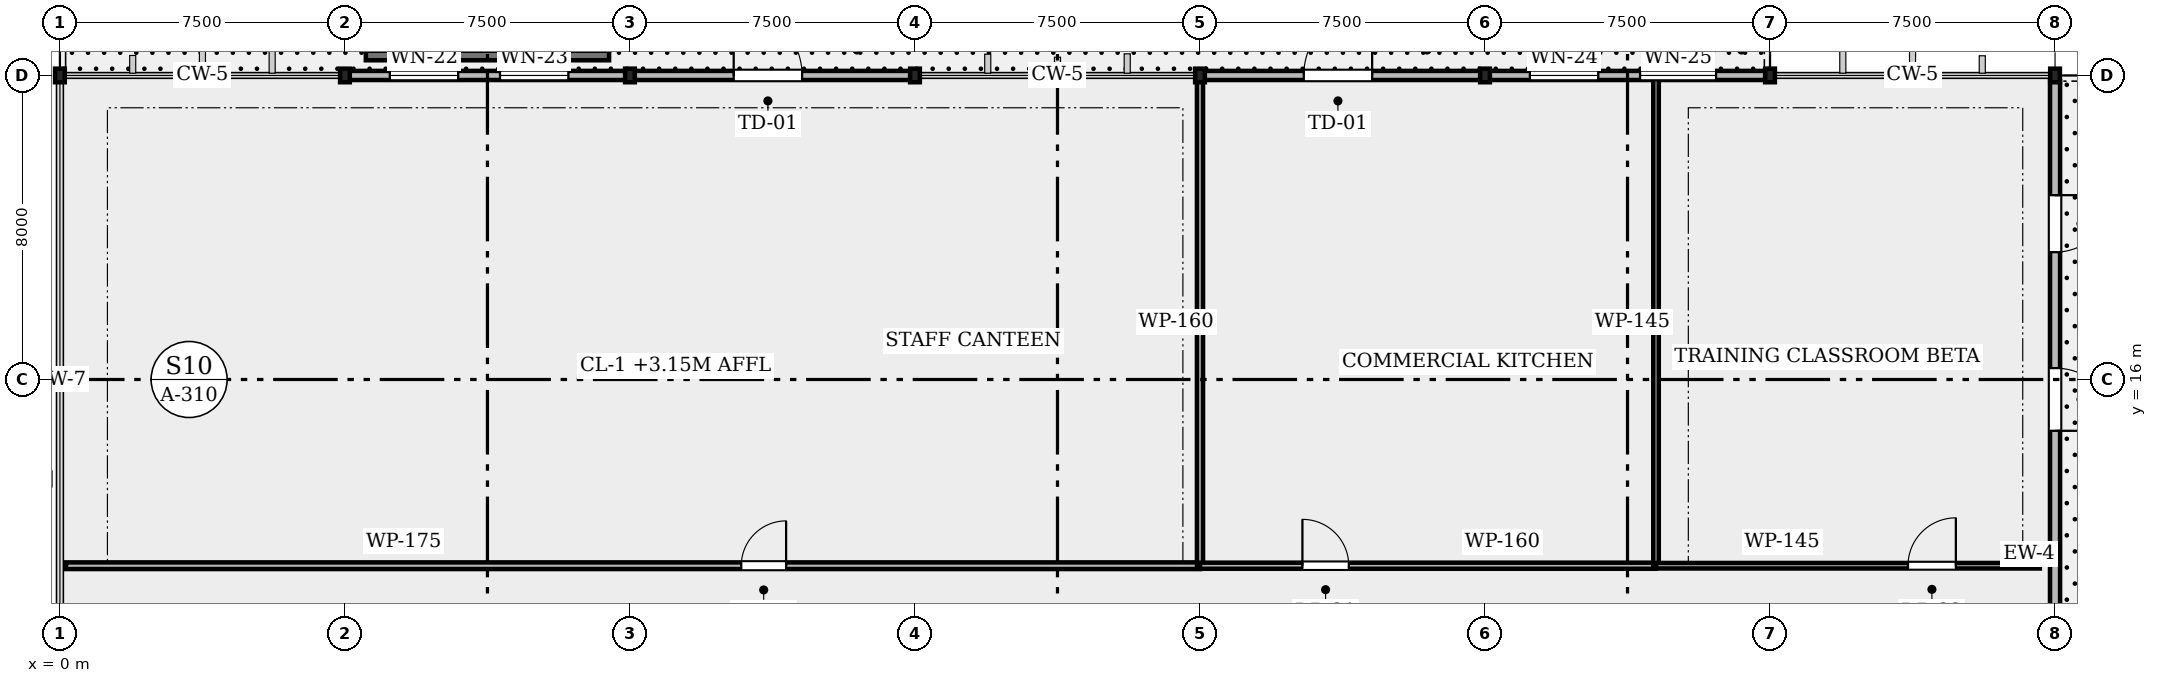
"""IFC4 building model, lengths in metres.
Left out: names, types, materials, properties, quantities, classifications, styles, units other than length and angle.
Written with IfcOpenShell. Run it as: python <this file> out.ifc"""

import sys

from ifc_helpers import new_model, si_unit, direction, frame, frame_2d, origin, origin_2d, place, context, subcontext, project, spatial, rectangle, i_section, extrude, element, fill, save


model = new_model("IFC4")
c1 = context("Model", 3, precision=1e-05, world=origin(), true_north=direction((0.0, 1.0)))
c2 = subcontext(c1, "Body", "Model", "MODEL_VIEW")
j1 = project(units=[si_unit("LENGTHUNIT", "METRE"), si_unit("PLANEANGLEUNIT", "RADIAN")], contexts=[c1])
p1 = place(None, origin())
s1 = spatial("IfcSite", under=j1, at=p1, CompositionType="ELEMENT")
p2 = place(p1, origin())
s2 = spatial("IfcBuilding", under=s1, at=p2, CompositionType="ELEMENT")
p3 = place(p2, frame((0.0, 0.0, 9.0)))
s3 = spatial("IfcBuildingStorey", under=s2, at=p3, CompositionType="ELEMENT", Elevation=9.0)
for number, where, z_axis, x_axis in (
    (1, (0.0, 24.0, 0.0), (0.0, 0.0, 1.0), (1.0, 0.0, 0.0)),
    (2, (7.5, 24.0, 0.0), (0.0, 0.0, 1.0), (1.0, 0.0, 0.0)),
    (3, (15.0, 24.0, 0.0), (0.0, 0.0, 1.0), (1.0, 0.0, 0.0)),
    (4, (22.5, 24.0, 0.0), (0.0, 0.0, 1.0), (1.0, 0.0, 0.0)),
    (5, (30.0, 24.0, 0.0), (0.0, 0.0, 1.0), (1.0, 0.0, 0.0)),
    (6, (37.5, 24.0, 0.0), (0.0, 0.0, 1.0), (1.0, 0.0, 0.0)),
    (7, (45.0, 24.0, 0.0), (0.0, 0.0, 1.0), (1.0, 0.0, 0.0)),
    (8, (52.5, 24.0, 0.0), (0.0, 0.0, 1.0), (1.0, 0.0, 0.0)),
):
    element("IfcColumn", number, at=place(p3, frame(where, z_axis=z_axis, x_axis=x_axis)), inside=s3, PredefinedType="COLUMN", context=c2, shape_type="SweptSolid", body=[
        extrude(i_section(OverallWidth=0.255, OverallDepth=0.357, WebThickness=0.01, FlangeThickness=0.018, FilletRadius=0.015, at=origin_2d()), origin(), (0.0, 0.0, 1.0), 5.86),
    ])
p4 = place(p3, frame((7.58, 24.0, 0.0), z_axis=(0.0, 0.0, 1.0), x_axis=(1.0, 0.0, 0.0)))
e9 = element("IfcWall", 9, at=p4, inside=s3, PredefinedType="SOLIDWALL", context=c2, shape_type="SweptSolid", body=[
    extrude(rectangle(XDim=7.34, YDim=0.24, at=frame_2d((3.67, 0.0))), origin(), (0.0, 0.0, 1.0), 3.8),
])
p5 = place(p4, frame((1.1, 0.0, 1.05)))
e10 = element("IfcOpeningElement", 10, at=p5, cuts=e9, PredefinedType="OPENING", context=c2, shape_type="SweptSolid", body=[
    extrude(rectangle(XDim=1.8, YDim=1.5, at=frame_2d((0.9, 0.75))), frame((0.0, 0.13, 0.0), z_axis=(0.0, -1.0, 0.0), x_axis=(1.0, 0.0, 0.0)), (0.0, 0.0, 1.0), 0.26),
])
p6 = place(p4, frame((4.0, 0.0, 1.05)))
e11 = element("IfcOpeningElement", 11, at=p6, cuts=e9, PredefinedType="OPENING", context=c2, shape_type="SweptSolid", body=[
    extrude(rectangle(XDim=1.8, YDim=1.65, at=frame_2d((0.9, 0.825))), frame((0.0, 0.13, 0.0), z_axis=(0.0, -1.0, 0.0), x_axis=(1.0, 0.0, 0.0)), (0.0, 0.0, 1.0), 0.26),
])
p7 = place(p3, frame((15.08, 24.0, 0.0), z_axis=(0.0, 0.0, 1.0), x_axis=(1.0, 0.0, 0.0)))
e12 = element("IfcWall", 12, at=p7, inside=s3, PredefinedType="SOLIDWALL", context=c2, shape_type="SweptSolid", body=[
    extrude(rectangle(XDim=7.34, YDim=0.24, at=frame_2d((3.67, 0.0))), origin(), (0.0, 0.0, 1.0), 4.3),
])
p8 = place(p7, frame((2.65, 0.0, 0.0)))
e13 = element("IfcOpeningElement", 13, at=p8, cuts=e12, PredefinedType="OPENING", context=c2, shape_type="SweptSolid", body=[
    extrude(rectangle(XDim=1.8, YDim=2.15, at=frame_2d((0.9, 1.075))), frame((0.0, 0.13, 0.0), z_axis=(0.0, -1.0, 0.0), x_axis=(1.0, 0.0, 0.0)), (0.0, 0.0, 1.0), 0.26),
])
p9 = place(p3, frame((30.08, 24.0, 0.0), z_axis=(0.0, 0.0, 1.0), x_axis=(1.0, 0.0, 0.0)))
e14 = element("IfcWall", 14, at=p9, inside=s3, PredefinedType="SOLIDWALL", context=c2, shape_type="SweptSolid", body=[
    extrude(rectangle(XDim=7.34, YDim=0.24, at=frame_2d((3.67, 0.0))), origin(), (0.0, 0.0, 1.0), 4.3),
])
p10 = place(p9, frame((2.65, 0.0, 0.0)))
e15 = element("IfcOpeningElement", 15, at=p10, cuts=e14, PredefinedType="OPENING", context=c2, shape_type="SweptSolid", body=[
    extrude(rectangle(XDim=1.8, YDim=2.15, at=frame_2d((0.9, 1.075))), frame((0.0, 0.13, 0.0), z_axis=(0.0, -1.0, 0.0), x_axis=(1.0, 0.0, 0.0)), (0.0, 0.0, 1.0), 0.26),
])
p11 = place(p3, frame((37.58, 24.0, 0.0), z_axis=(0.0, 0.0, 1.0), x_axis=(1.0, 0.0, 0.0)))
e16 = element("IfcWall", 16, at=p11, inside=s3, PredefinedType="SOLIDWALL", context=c2, shape_type="SweptSolid", body=[
    extrude(rectangle(XDim=7.34, YDim=0.24, at=frame_2d((3.67, 0.0))), origin(), (0.0, 0.0, 1.0), 3.8),
])
p12 = place(p11, frame((1.1, 0.0, 1.05)))
e17 = element("IfcOpeningElement", 17, at=p12, cuts=e16, PredefinedType="OPENING", context=c2, shape_type="SweptSolid", body=[
    extrude(rectangle(XDim=1.8, YDim=1.8, at=frame_2d((0.9, 0.9))), frame((0.0, 0.13, 0.0), z_axis=(0.0, -1.0, 0.0), x_axis=(1.0, 0.0, 0.0)), (0.0, 0.0, 1.0), 0.26),
])
p13 = place(p11, frame((4.0, 0.0, 1.05)))
e18 = element("IfcOpeningElement", 18, at=p13, cuts=e16, PredefinedType="OPENING", context=c2, shape_type="SweptSolid", body=[
    extrude(rectangle(XDim=2.0, YDim=1.2, at=frame_2d((1.0, 0.6))), frame((0.0, 0.13, 0.0), z_axis=(0.0, -1.0, 0.0), x_axis=(1.0, 0.0, 0.0)), (0.0, 0.0, 1.0), 0.26),
])
p14 = place(p3, frame((52.5, 8.15, 0.0), z_axis=(0.0, 0.0, 1.0), x_axis=(0.0, 1.0, 0.0)))
e19 = element("IfcWall", 19, at=p14, inside=s3, PredefinedType="SOLIDWALL", context=c2, shape_type="SweptSolid", body=[
    extrude(rectangle(XDim=15.7, YDim=0.265, at=frame_2d((7.85, 0.0))), origin(), (0.0, 0.0, 1.0), 4.3),
])
p15 = place(p14, frame((6.5, 0.0, 0.0)))
e20 = element("IfcOpeningElement", 20, at=p15, cuts=e19, PredefinedType="OPENING", context=c2, shape_type="SweptSolid", body=[
    extrude(rectangle(XDim=1.65, YDim=2.15, at=frame_2d((0.825, 1.075))), frame((0.0, 0.142, 0.0), z_axis=(0.0, -1.0, 0.0), x_axis=(1.0, 0.0, 0.0)), (0.0, 0.0, 1.0), 0.285),
])
p16 = place(p14, frame((11.2, 0.0, 0.0)))
e21 = element("IfcOpeningElement", 21, at=p16, cuts=e19, PredefinedType="OPENING", context=c2, shape_type="SweptSolid", body=[
    extrude(rectangle(XDim=1.5, YDim=2.15, at=frame_2d((0.75, 1.075))), frame((0.0, 0.142, 0.0), z_axis=(0.0, -1.0, 0.0), x_axis=(1.0, 0.0, 0.0)), (0.0, 0.0, 1.0), 0.285),
])
p17 = place(p3, frame((8.05, 24.525, 0.0), z_axis=(0.0, 0.0, 1.0), x_axis=(1.0, 0.0, 0.0)))
e22 = element("IfcWall", 22, at=p17, inside=s3, PredefinedType="SHEAR", context=c2, shape_type="SweptSolid", body=[
    extrude(rectangle(XDim=6.4, YDim=0.25, at=frame_2d((3.2, 0.0))), origin(), (0.0, 0.0, 1.0), 3.55),
])
p18 = place(p3, frame((0.16, 11.1, 0.0), z_axis=(0.0, 0.0, 1.0), x_axis=(1.0, 0.0, 0.0)))
e23 = element("IfcWall", 23, at=p18, inside=s3, PredefinedType="PARTITIONING", context=c2, shape_type="SweptSolid", body=[
    extrude(rectangle(XDim=29.84, YDim=0.175, at=frame_2d((14.92, 0.0))), origin(), (0.0, 0.0, 1.0), 3.7),
])
p19 = place(p18, frame((17.769, 0.0, 0.0)))
e24 = element("IfcOpeningElement", 24, at=p19, cuts=e23, PredefinedType="OPENING", context=c2, shape_type="SweptSolid", body=[
    extrude(rectangle(XDim=1.18, YDim=2.14, at=frame_2d((0.59, 1.07))), frame((0.0, 0.097, 0.0), z_axis=(0.0, -1.0, 0.0), x_axis=(1.0, 0.0, 0.0)), (0.0, 0.0, 1.0), 0.195),
])
p20 = place(p3, frame((30.0, 11.1, 0.0), z_axis=(0.0, 0.0, 1.0), x_axis=(0.0, 1.0, 0.0)))
e25 = element("IfcWall", 25, at=p20, inside=s3, PredefinedType="PARTITIONING", context=c2, shape_type="SweptSolid", body=[
    extrude(rectangle(XDim=12.82, YDim=0.16, at=frame_2d((6.41, 0.0))), origin(), (0.0, 0.0, 1.0), 3.7),
])
p21 = place(p3, frame((30.0, 11.1, 0.0), z_axis=(0.0, 0.0, 1.0), x_axis=(1.0, 0.0, 0.0)))
e26 = element("IfcWall", 26, at=p21, inside=s3, PredefinedType="PARTITIONING", context=c2, shape_type="SweptSolid", body=[
    extrude(rectangle(XDim=12.0, YDim=0.16, at=frame_2d((6.0, 0.0))), origin(), (0.0, 0.0, 1.0), 3.7),
])
p22 = place(p21, frame((2.695, 0.0, 0.0)))
e27 = element("IfcOpeningElement", 27, at=p22, cuts=e26, PredefinedType="OPENING", context=c2, shape_type="SweptSolid", body=[
    extrude(rectangle(XDim=1.22, YDim=2.15, at=frame_2d((0.61, 1.075))), frame((0.0, 0.09, 0.0), z_axis=(0.0, -1.0, 0.0), x_axis=(1.0, 0.0, 0.0)), (0.0, 0.0, 1.0), 0.18),
])
p23 = place(p3, frame((42.0, 11.1, 0.0), z_axis=(0.0, 0.0, 1.0), x_axis=(0.0, 1.0, 0.0)))
e28 = element("IfcWall", 28, at=p23, inside=s3, PredefinedType="PARTITIONING", context=c2, shape_type="SweptSolid", body=[
    extrude(rectangle(XDim=12.82, YDim=0.145, at=frame_2d((6.41, 0.0))), origin(), (0.0, 0.0, 1.0), 3.7),
])
p24 = place(p3, frame((42.0, 11.1, 0.0), z_axis=(0.0, 0.0, 1.0), x_axis=(1.0, 0.0, 0.0)))
e29 = element("IfcWall", 29, at=p24, inside=s3, PredefinedType="PARTITIONING", context=c2, shape_type="SweptSolid", body=[
    extrude(rectangle(XDim=10.1, YDim=0.145, at=frame_2d((5.05, 0.0))), origin(), (0.0, 0.0, 1.0), 3.7),
])
p25 = place(p24, frame((6.63, 0.0, 0.0)))
e30 = element("IfcOpeningElement", 30, at=p25, cuts=e29, PredefinedType="OPENING", context=c2, shape_type="SweptSolid", body=[
    extrude(rectangle(XDim=1.26, YDim=2.16, at=frame_2d((0.63, 1.08))), frame((0.0, 0.083, 0.0), z_axis=(0.0, -1.0, 0.0), x_axis=(1.0, 0.0, 0.0)), (0.0, 0.0, 1.0), 0.165),
])
p26 = place(p5, origin())
e31 = element("IfcWindow", 31, at=p26, inside=s3, PartitioningType="SINGLE_PANEL", PredefinedType="WINDOW", context=c2, shape_type="SweptSolid", body=[
    extrude(rectangle(XDim=1.8, YDim=1.5, at=frame_2d((0.9, 0.75))), frame((0.0, 0.03, 0.0), z_axis=(0.0, -1.0, 0.0), x_axis=(1.0, 0.0, 0.0)), (0.0, 0.0, 1.0), 0.06),
])
fill(e10, e31)
p27 = place(p6, origin())
e32 = element("IfcWindow", 32, at=p27, inside=s3, PartitioningType="SINGLE_PANEL", PredefinedType="WINDOW", context=c2, shape_type="SweptSolid", body=[
    extrude(rectangle(XDim=1.8, YDim=1.65, at=frame_2d((0.9, 0.825))), frame((0.0, 0.03, 0.0), z_axis=(0.0, -1.0, 0.0), x_axis=(1.0, 0.0, 0.0)), (0.0, 0.0, 1.0), 0.06),
])
fill(e11, e32)
p28 = place(p8, origin())
e33 = element("IfcDoor", 33, at=p28, inside=s3, OperationType="SINGLE_SWING_LEFT", PredefinedType="DOOR", context=c2, shape_type="SweptSolid", body=[
    extrude(rectangle(XDim=1.8, YDim=2.15, at=frame_2d((0.9, 1.075))), frame((0.0, 0.025, 0.0), z_axis=(0.0, -1.0, 0.0), x_axis=(1.0, 0.0, 0.0)), (0.0, 0.0, 1.0), 0.05),
])
fill(e13, e33)
p29 = place(p10, origin())
e34 = element("IfcDoor", 34, at=p29, inside=s3, OperationType="SINGLE_SWING_RIGHT", PredefinedType="DOOR", context=c2, shape_type="SweptSolid", body=[
    extrude(rectangle(XDim=1.8, YDim=2.15, at=frame_2d((0.9, 1.075))), frame((0.0, 0.025, 0.0), z_axis=(0.0, -1.0, 0.0), x_axis=(1.0, 0.0, 0.0)), (0.0, 0.0, 1.0), 0.05),
])
fill(e15, e34)
p30 = place(p12, origin())
e35 = element("IfcWindow", 35, at=p30, inside=s3, PartitioningType="SINGLE_PANEL", PredefinedType="WINDOW", context=c2, shape_type="SweptSolid", body=[
    extrude(rectangle(XDim=1.8, YDim=1.8, at=frame_2d((0.9, 0.9))), frame((0.0, 0.03, 0.0), z_axis=(0.0, -1.0, 0.0), x_axis=(1.0, 0.0, 0.0)), (0.0, 0.0, 1.0), 0.06),
])
fill(e17, e35)
p31 = place(p13, origin())
e36 = element("IfcWindow", 36, at=p31, inside=s3, PartitioningType="SINGLE_PANEL", PredefinedType="WINDOW", context=c2, shape_type="SweptSolid", body=[
    extrude(rectangle(XDim=2.0, YDim=1.2, at=frame_2d((1.0, 0.6))), frame((0.0, 0.03, 0.0), z_axis=(0.0, -1.0, 0.0), x_axis=(1.0, 0.0, 0.0)), (0.0, 0.0, 1.0), 0.06),
])
fill(e18, e36)
p32 = place(p15, frame((1.65, 0.0, 0.0), z_axis=(0.0, 0.0, 1.0), x_axis=(-1.0, 0.0, 0.0)))
e37 = element("IfcDoor", 37, at=p32, inside=s3, OperationType="SINGLE_SWING_RIGHT", PredefinedType="DOOR", context=c2, shape_type="SweptSolid", body=[
    extrude(rectangle(XDim=1.65, YDim=2.15, at=frame_2d((0.825, 1.075))), frame((0.0, 0.025, 0.0), z_axis=(0.0, -1.0, 0.0), x_axis=(1.0, 0.0, 0.0)), (0.0, 0.0, 1.0), 0.05),
])
fill(e20, e37)
p33 = place(p16, frame((1.5, 0.0, 0.0), z_axis=(0.0, 0.0, 1.0), x_axis=(-1.0, 0.0, 0.0)))
e38 = element("IfcDoor", 38, at=p33, inside=s3, OperationType="SINGLE_SWING_LEFT", PredefinedType="DOOR", context=c2, shape_type="SweptSolid", body=[
    extrude(rectangle(XDim=1.5, YDim=2.15, at=frame_2d((0.75, 1.075))), frame((0.0, 0.025, 0.0), z_axis=(0.0, -1.0, 0.0), x_axis=(1.0, 0.0, 0.0)), (0.0, 0.0, 1.0), 0.05),
])
fill(e21, e38)
p34 = place(p19, origin())
e39 = element("IfcDoor", 39, at=p34, inside=s3, OperationType="SINGLE_SWING_RIGHT", PredefinedType="DOOR", context=c2, shape_type="SweptSolid", body=[
    extrude(rectangle(XDim=1.18, YDim=2.14, at=frame_2d((0.59, 1.07))), frame((0.0, 0.025, 0.0), z_axis=(0.0, -1.0, 0.0), x_axis=(1.0, 0.0, 0.0)), (0.0, 0.0, 1.0), 0.05),
])
fill(e24, e39)
p35 = place(p22, origin())
e40 = element("IfcDoor", 40, at=p35, inside=s3, OperationType="SINGLE_SWING_LEFT", PredefinedType="DOOR", context=c2, shape_type="SweptSolid", body=[
    extrude(rectangle(XDim=1.22, YDim=2.15, at=frame_2d((0.61, 1.075))), frame((0.0, 0.025, 0.0), z_axis=(0.0, -1.0, 0.0), x_axis=(1.0, 0.0, 0.0)), (0.0, 0.0, 1.0), 0.05),
])
fill(e27, e40)
p36 = place(p25, origin())
e41 = element("IfcDoor", 41, at=p36, inside=s3, OperationType="SINGLE_SWING_RIGHT", PredefinedType="DOOR", context=c2, shape_type="SweptSolid", body=[
    extrude(rectangle(XDim=1.26, YDim=2.16, at=frame_2d((0.63, 1.08))), frame((0.0, 0.025, 0.0), z_axis=(0.0, -1.0, 0.0), x_axis=(1.0, 0.0, 0.0)), (0.0, 0.0, 1.0), 0.05),
])
fill(e30, e41)
save(model, sys.argv[1])
